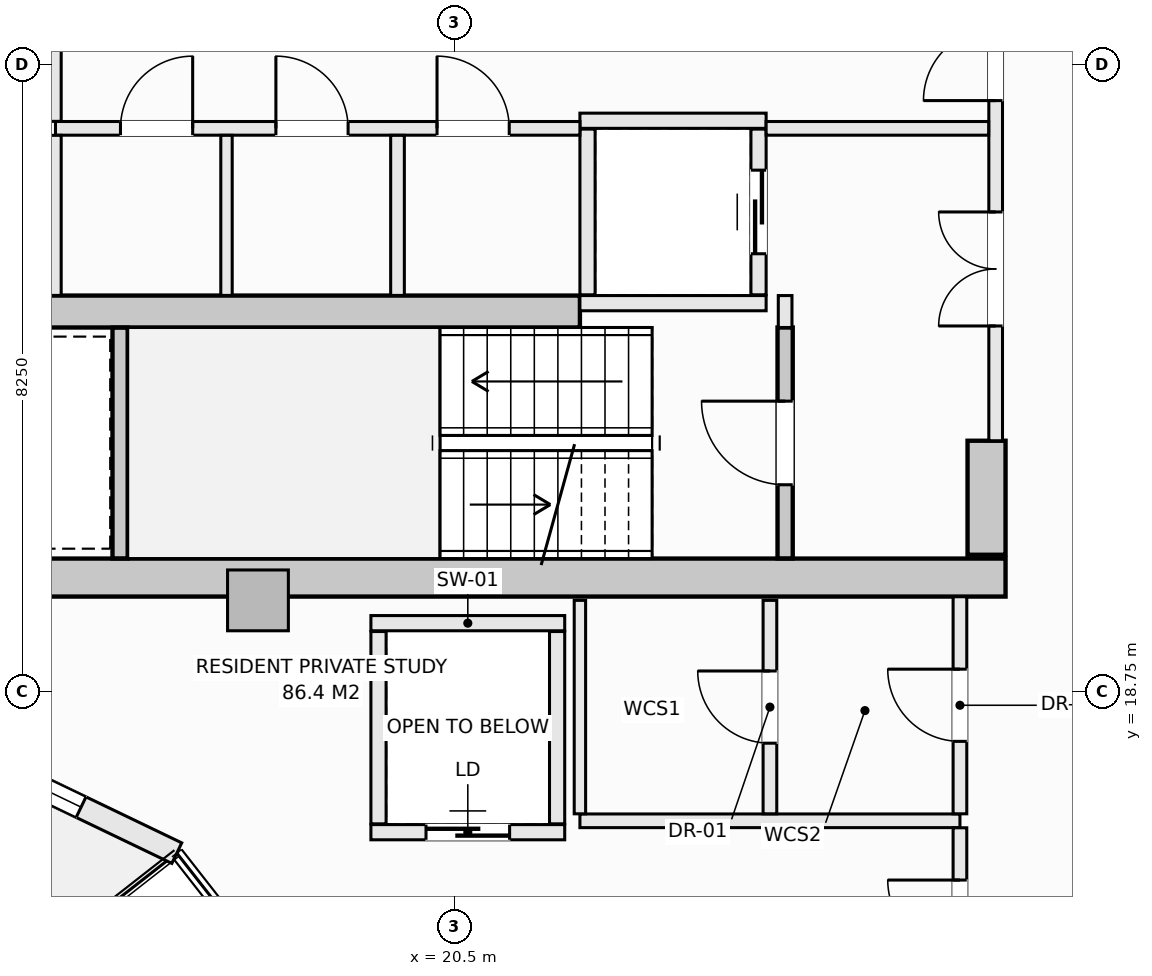
"""IFC4 building model, lengths in metres.
Left out: names, types, materials, properties, quantities, classifications, styles, units other than length and angle.
Written with IfcOpenShell. Run it as: python <this file> out.ifc"""

import sys

from ifc_helpers import new_model, si_unit, direction, frame, frame_2d, origin, origin_2d, place, context, subcontext, project, spatial, rectangle, extrude, element, fill, save


model = new_model("IFC4")
c1 = context("Model", 3, precision=1e-05, world=origin(), true_north=direction((0.0, 1.0)))
c2 = subcontext(c1, "Body", "Model", "MODEL_VIEW")
j1 = project(units=[si_unit("LENGTHUNIT", "METRE"), si_unit("PLANEANGLEUNIT", "RADIAN")], contexts=[c1])
p1 = place(None, origin())
s1 = spatial("IfcSite", under=j1, at=p1, CompositionType="ELEMENT")
p2 = place(p1, origin())
s2 = spatial("IfcBuilding", under=s1, at=p2, CompositionType="ELEMENT")
p3 = place(p2, frame((0.0, 0.0, 272.3)))
s3 = spatial("IfcBuildingStorey", under=s2, at=p3, CompositionType="ELEMENT", Elevation=272.3)
p4 = place(p3, frame((14.25, 20.25, -0.27), z_axis=(0.0, 0.0, 1.0), x_axis=(1.0, 0.0, 0.0)))
e1 = element("IfcWall", 1, at=p4, inside=s3, PredefinedType="SHEAR", context=c2, shape_type="SweptSolid", body=[
    extrude(rectangle(XDim=13.5, YDim=0.5, at=frame_2d((6.75, 0.0))), origin(), (0.0, 0.0, 1.0), 3.25),
])
p5 = place(p3, frame((27.5, 20.55, -0.27), z_axis=(0.0, 0.0, 1.0), x_axis=(0.0, 1.0, 0.0)))
e2 = element("IfcWall", 2, at=p5, inside=s3, PredefinedType="SHEAR", context=c2, shape_type="SweptSolid", body=[
    extrude(rectangle(XDim=1.5, YDim=0.5, at=frame_2d((0.75, 0.0))), origin(), (0.0, 0.0, 1.0), 3.25),
])
p6 = place(p3, frame((14.85, 23.75, -0.27), z_axis=(0.0, 0.0, 1.0), x_axis=(1.0, 0.0, 0.0)))
e3 = element("IfcWall", 3, at=p6, inside=s3, PredefinedType="SHEAR", context=c2, shape_type="SweptSolid", body=[
    extrude(rectangle(XDim=7.3, YDim=0.42, at=frame_2d((3.65, 0.0))), origin(), (0.0, 0.0, 1.0), 3.25),
])
p7 = place(p3, frame((17.914, 19.95, -0.27), z_axis=(0.0, 0.0, 1.0), x_axis=(1.0, 0.0, 0.0)))
e4 = element("IfcColumn", 4, at=p7, inside=s3, PredefinedType="PILASTER", context=c2, shape_type="SweptSolid", body=[
    extrude(rectangle(XDim=0.8, YDim=0.8, at=origin_2d()), origin(), (0.0, 0.0, 1.0), 3.25),
])
p8 = place(p3, frame((12.344, 18.788, 0.0), z_axis=(0.0, 0.0, 1.0), x_axis=(0.901346013132, -0.433099716706, 0.0)))
e5 = element("IfcWall", 5, at=p8, inside=s3, PredefinedType="SOLIDWALL", context=c2, shape_type="SweptSolid", body=[
    extrude(rectangle(XDim=4.994, YDim=0.3, at=frame_2d((2.497, 0.0))), origin(), (0.0, 0.0, 1.0), 2.555),
])
p9 = place(p8, frame((1.397, 0.0, 0.72)))
e6 = element("IfcOpeningElement", 6, at=p9, cuts=e5, PredefinedType="OPENING", context=c2, shape_type="SweptSolid", body=[
    extrude(rectangle(XDim=2.2, YDim=1.65, at=frame_2d((1.1, 0.825))), frame((0.0, 0.16, 0.0), z_axis=(0.0, -1.0, 0.0), x_axis=(1.0, 0.0, 0.0)), (0.0, 0.0, 1.0), 0.32),
])
p10 = place(p3, frame((24.85, 20.502, -0.27), z_axis=(0.0, 0.0, 1.0), x_axis=(0.0, 1.0, 0.0)))
e7 = element("IfcWall", 7, at=p10, inside=s3, PredefinedType="SHEAR", context=c2, shape_type="SweptSolid", body=[
    extrude(rectangle(XDim=3.038, YDim=0.2, at=frame_2d((1.519, 0.0))), origin(), (0.0, 0.0, 1.0), 3.25),
])
p11 = place(p10, frame((0.969, 0.0, 0.27)))
e8 = element("IfcOpeningElement", 8, at=p11, cuts=e7, PredefinedType="OPENING", context=c2, shape_type="SweptSolid", body=[
    extrude(rectangle(XDim=1.1, YDim=2.15, at=frame_2d((0.55, 1.075))), frame((0.0, 0.11, 0.0), z_axis=(0.0, -1.0, 0.0), x_axis=(1.0, 0.0, 0.0)), (0.0, 0.0, 1.0), 0.22),
])
p12 = place(p3, frame((16.1, 20.502, -0.27), z_axis=(0.0, 0.0, 1.0), x_axis=(0.0, 1.0, 0.0)))
e9 = element("IfcWall", 9, at=p12, inside=s3, PredefinedType="SHEAR", context=c2, shape_type="SweptSolid", body=[
    extrude(rectangle(XDim=3.036, YDim=0.2, at=frame_2d((1.518, 0.0))), origin(), (0.0, 0.0, 1.0), 3.25),
])
for number, where, z_axis, x_axis in (
    (10, (22.15, 26.26, 0.0), (0.0, 0.0, 1.0), (1.0, 0.0, 0.0)),
    (11, (22.15, 23.86, 0.0), (0.0, 0.0, 1.0), (1.0, 0.0, 0.0)),
):
    element("IfcWall", number, at=place(p3, frame(where, z_axis=z_axis, x_axis=x_axis)), inside=s3, PredefinedType="SOLIDWALL", context=c2, shape_type="SweptSolid", body=[
        extrude(rectangle(XDim=2.45, YDim=0.2, at=frame_2d((1.225, 0.0))), origin(), (0.0, 0.0, 1.0), 2.98),
    ])
p13 = place(p3, frame((22.25, 23.97, 0.0), z_axis=(0.0, 0.0, 1.0), x_axis=(0.0, 1.0, 0.0)))
e12 = element("IfcWall", 12, at=p13, inside=s3, PredefinedType="SOLIDWALL", context=c2, shape_type="SweptSolid", body=[
    extrude(rectangle(XDim=2.18, YDim=0.2, at=frame_2d((1.09, 0.0))), origin(), (0.0, 0.0, 1.0), 2.98),
])
p14 = place(p3, frame((24.5, 23.97, 0.0), z_axis=(0.0, 0.0, 1.0), x_axis=(0.0, 1.0, 0.0)))
e13 = element("IfcWall", 13, at=p14, inside=s3, PredefinedType="SOLIDWALL", context=c2, shape_type="SweptSolid", body=[
    extrude(rectangle(XDim=2.18, YDim=0.2, at=frame_2d((1.09, 0.0))), origin(), (0.0, 0.0, 1.0), 2.98),
])
p15 = place(p14, frame((0.54, 0.0, 0.0)))
e14 = element("IfcOpeningElement", 14, at=p15, cuts=e13, PredefinedType="OPENING", context=c2, shape_type="SweptSolid", body=[
    extrude(rectangle(XDim=1.1, YDim=2.2, at=frame_2d((0.55, 1.1))), frame((0.0, 0.11, 0.0), z_axis=(0.0, -1.0, 0.0), x_axis=(1.0, 0.0, 0.0)), (0.0, 0.0, 1.0), 0.22),
])
p16 = place(p3, frame((19.4, 19.65, 0.0), z_axis=(0.0, 0.0, 1.0), x_axis=(1.0, 0.0, 0.0)))
e15 = element("IfcWall", 15, at=p16, inside=s3, PredefinedType="SOLIDWALL", context=c2, shape_type="SweptSolid", body=[
    extrude(rectangle(XDim=2.55, YDim=0.2, at=frame_2d((1.275, 0.0))), origin(), (0.0, 0.0, 1.0), 2.98),
])
p17 = place(p3, frame((19.4, 16.9, 0.0), z_axis=(0.0, 0.0, 1.0), x_axis=(1.0, 0.0, 0.0)))
e16 = element("IfcWall", 16, at=p17, inside=s3, PredefinedType="SOLIDWALL", context=c2, shape_type="SweptSolid", body=[
    extrude(rectangle(XDim=2.55, YDim=0.2, at=frame_2d((1.275, 0.0))), origin(), (0.0, 0.0, 1.0), 2.98),
])
p18 = place(p17, frame((0.725, 0.0, 0.0)))
e17 = element("IfcOpeningElement", 17, at=p18, cuts=e16, PredefinedType="OPENING", context=c2, shape_type="SweptSolid", body=[
    extrude(rectangle(XDim=1.1, YDim=2.2, at=frame_2d((0.55, 1.1))), frame((0.0, 0.11, 0.0), z_axis=(0.0, -1.0, 0.0), x_axis=(1.0, 0.0, 0.0)), (0.0, 0.0, 1.0), 0.22),
])
for number, where, z_axis, x_axis in (
    (18, (19.5, 17.01, 0.0), (0.0, 0.0, 1.0), (0.0, 1.0, 0.0)),
    (19, (21.85, 17.01, 0.0), (0.0, 0.0, 1.0), (0.0, 1.0, 0.0)),
):
    element("IfcWall", number, at=place(p3, frame(where, z_axis=z_axis, x_axis=x_axis)), inside=s3, PredefinedType="SOLIDWALL", context=c2, shape_type="SweptSolid", body=[
        extrude(rectangle(XDim=2.53, YDim=0.2, at=frame_2d((1.265, 0.0))), origin(), (0.0, 0.0, 1.0), 2.98),
    ])
p19 = place(p3, frame((24.85, 23.54, 0.0), z_axis=(0.0, 0.0, 1.0), x_axis=(0.0, 1.0, 0.0)))
e20 = element("IfcWall", 20, at=p19, inside=s3, PredefinedType="SOLIDWALL", context=c2, shape_type="SweptSolid", body=[
    extrude(rectangle(XDim=0.42, YDim=0.18, at=frame_2d((0.21, 0.0))), origin(), (0.0, 0.0, 1.0), 2.98),
])
p20 = place(p3, frame((27.62, 22.05, 0.0), z_axis=(0.0, 0.0, 1.0), x_axis=(0.0, 1.0, 0.0)))
e21 = element("IfcWall", 21, at=p20, inside=s3, PredefinedType="SOLIDWALL", context=c2, shape_type="SweptSolid", body=[
    extrude(rectangle(XDim=9.9, YDim=0.18, at=frame_2d((4.95, 0.0))), origin(), (0.0, 0.0, 1.0), 2.98),
])
p21 = place(p20, frame((4.475, 0.0, 0.0)))
e22 = element("IfcOpeningElement", 22, at=p21, cuts=e21, PredefinedType="OPENING", context=c2, shape_type="SweptSolid", body=[
    extrude(rectangle(XDim=0.95, YDim=2.1, at=frame_2d((0.475, 1.05))), frame((0.0, 0.1, 0.0), z_axis=(0.0, -1.0, 0.0), x_axis=(1.0, 0.0, 0.0)), (0.0, 0.0, 1.0), 0.2),
])
p22 = place(p20, frame((6.89, 0.0, 0.0)))
e23 = element("IfcOpeningElement", 23, at=p22, cuts=e21, PredefinedType="OPENING", context=c2, shape_type="SweptSolid", body=[
    extrude(rectangle(XDim=1.5, YDim=2.2, at=frame_2d((0.75, 1.1))), frame((0.0, 0.1, 0.0), z_axis=(0.0, -1.0, 0.0), x_axis=(1.0, 0.0, 0.0)), (0.0, 0.0, 1.0), 0.2),
])
p23 = place(p20, frame((1.51, 0.0, 0.0)))
e24 = element("IfcOpeningElement", 24, at=p23, cuts=e21, PredefinedType="OPENING", context=c2, shape_type="SweptSolid", body=[
    extrude(rectangle(XDim=1.5, YDim=2.2, at=frame_2d((0.75, 1.1))), frame((0.0, 0.1, 0.0), z_axis=(0.0, -1.0, 0.0), x_axis=(1.0, 0.0, 0.0)), (0.0, 0.0, 1.0), 0.2),
])
p24 = place(p3, frame((15.25, 26.16, 0.0), z_axis=(0.0, 0.0, 1.0), x_axis=(1.0, 0.0, 0.0)))
e25 = element("IfcWall", 25, at=p24, inside=s3, PredefinedType="SOLIDWALL", context=c2, shape_type="SweptSolid", body=[
    extrude(rectangle(XDim=6.9, YDim=0.18, at=frame_2d((3.45, 0.0))), origin(), (0.0, 0.0, 1.0), 2.98),
])
p25 = place(p24, frame((5.02, 0.0, 0.0)))
e26 = element("IfcOpeningElement", 26, at=p25, cuts=e25, PredefinedType="OPENING", context=c2, shape_type="SweptSolid", body=[
    extrude(rectangle(XDim=0.95, YDim=2.1, at=frame_2d((0.475, 1.05))), frame((0.0, 0.1, 0.0), z_axis=(0.0, -1.0, 0.0), x_axis=(1.0, 0.0, 0.0)), (0.0, 0.0, 1.0), 0.2),
])
p26 = place(p24, frame((0.855, 0.0, 0.0)))
e27 = element("IfcOpeningElement", 27, at=p26, cuts=e25, PredefinedType="OPENING", context=c2, shape_type="SweptSolid", body=[
    extrude(rectangle(XDim=0.95, YDim=2.1, at=frame_2d((0.475, 1.05))), frame((0.0, 0.1, 0.0), z_axis=(0.0, -1.0, 0.0), x_axis=(1.0, 0.0, 0.0)), (0.0, 0.0, 1.0), 0.2),
])
p27 = place(p24, frame((2.9, 0.0, 0.0)))
e28 = element("IfcOpeningElement", 28, at=p27, cuts=e25, PredefinedType="OPENING", context=c2, shape_type="SweptSolid", body=[
    extrude(rectangle(XDim=0.95, YDim=2.1, at=frame_2d((0.475, 1.05))), frame((0.0, 0.1, 0.0), z_axis=(0.0, -1.0, 0.0), x_axis=(1.0, 0.0, 0.0)), (0.0, 0.0, 1.0), 0.2),
])
p28 = place(p3, frame((24.6, 26.16, 0.0), z_axis=(0.0, 0.0, 1.0), x_axis=(1.0, 0.0, 0.0)))
e29 = element("IfcWall", 29, at=p28, inside=s3, PredefinedType="SOLIDWALL", context=c2, shape_type="SweptSolid", body=[
    extrude(rectangle(XDim=2.928, YDim=0.18, at=frame_2d((1.464, 0.0))), origin(), (0.0, 0.0, 1.0), 2.98),
])
p29 = place(p3, frame((15.25, 23.962, 0.0), z_axis=(0.0, 0.0, 1.0), x_axis=(0.0, 1.0, 0.0)))
e30 = element("IfcWall", 30, at=p29, inside=s3, PredefinedType="PARTITIONING", context=c2, shape_type="SweptSolid", body=[
    extrude(rectangle(XDim=2.106, YDim=0.15, at=frame_2d((1.053, 0.0))), origin(), (0.0, 0.0, 1.0), 2.98),
])
p30 = place(p3, frame((15.25, 26.252, 0.0), z_axis=(0.0, 0.0, 1.0), x_axis=(0.0, 1.0, 0.0)))
e31 = element("IfcWall", 31, at=p30, inside=s3, PredefinedType="PARTITIONING", context=c2, shape_type="SweptSolid", body=[
    extrude(rectangle(XDim=1.496, YDim=0.15, at=frame_2d((0.748, 0.0))), origin(), (0.0, 0.0, 1.0), 2.98),
])
p31 = place(p3, frame((19.75, 23.962, 0.0), z_axis=(0.0, 0.0, 1.0), x_axis=(0.0, 1.0, 0.0)))
e32 = element("IfcWall", 32, at=p31, inside=s3, PredefinedType="SOLIDWALL", context=c2, shape_type="SweptSolid", body=[
    extrude(rectangle(XDim=2.106, YDim=0.18, at=frame_2d((1.053, 0.0))), origin(), (0.0, 0.0, 1.0), 2.98),
])
p32 = place(p3, frame((17.5, 23.962, 0.0), z_axis=(0.0, 0.0, 1.0), x_axis=(0.0, 1.0, 0.0)))
e33 = element("IfcWall", 33, at=p32, inside=s3, PredefinedType="PARTITIONING", context=c2, shape_type="SweptSolid", body=[
    extrude(rectangle(XDim=2.106, YDim=0.15, at=frame_2d((1.053, 0.0))), origin(), (0.0, 0.0, 1.0), 2.98),
])
p33 = place(p3, frame((22.15, 17.05, 0.0), z_axis=(0.0, 0.0, 1.0), x_axis=(1.0, 0.0, 0.0)))
e34 = element("IfcWall", 34, at=p33, inside=s3, PredefinedType="SOLIDWALL", context=c2, shape_type="SweptSolid", body=[
    extrude(rectangle(XDim=5.0, YDim=0.18, at=frame_2d((2.5, 0.0))), origin(), (0.0, 0.0, 1.0), 2.98),
])
p34 = place(p3, frame((22.15, 17.142, 0.0), z_axis=(0.0, 0.0, 1.0), x_axis=(0.0, 1.0, 0.0)))
e35 = element("IfcWall", 35, at=p34, inside=s3, PredefinedType="PARTITIONING", context=c2, shape_type="SweptSolid", body=[
    extrude(rectangle(XDim=2.808, YDim=0.15, at=frame_2d((1.404, 0.0))), origin(), (0.0, 0.0, 1.0), 2.98),
])
p35 = place(p3, frame((24.65, 17.142, 0.0), z_axis=(0.0, 0.0, 1.0), x_axis=(0.0, 1.0, 0.0)))
e36 = element("IfcWall", 36, at=p35, inside=s3, PredefinedType="SOLIDWALL", context=c2, shape_type="SweptSolid", body=[
    extrude(rectangle(XDim=2.808, YDim=0.18, at=frame_2d((1.404, 0.0))), origin(), (0.0, 0.0, 1.0), 2.98),
])
p36 = place(p35, frame((0.929, 0.0, 0.0)))
e37 = element("IfcOpeningElement", 37, at=p36, cuts=e36, PredefinedType="OPENING", context=c2, shape_type="SweptSolid", body=[
    extrude(rectangle(XDim=0.95, YDim=2.1, at=frame_2d((0.475, 1.05))), frame((0.0, 0.1, 0.0), z_axis=(0.0, -1.0, 0.0), x_axis=(1.0, 0.0, 0.0)), (0.0, 0.0, 1.0), 0.2),
])
p37 = place(p3, frame((27.15, 13.181, 0.0), z_axis=(0.0, 0.0, 1.0), x_axis=(0.0, 1.0, 0.0)))
e38 = element("IfcWall", 38, at=p37, inside=s3, PredefinedType="SOLIDWALL", context=c2, shape_type="SweptSolid", body=[
    extrude(rectangle(XDim=3.777, YDim=0.18, at=frame_2d((1.889, 0.0))), origin(), (0.0, 0.0, 1.0), 2.98),
])
p38 = place(p37, frame((2.139, 0.0, 0.0)))
e39 = element("IfcOpeningElement", 39, at=p38, cuts=e38, PredefinedType="OPENING", context=c2, shape_type="SweptSolid", body=[
    extrude(rectangle(XDim=0.95, YDim=2.1, at=frame_2d((0.475, 1.05))), frame((0.0, 0.1, 0.0), z_axis=(0.0, -1.0, 0.0), x_axis=(1.0, 0.0, 0.0)), (0.0, 0.0, 1.0), 0.2),
])
p39 = place(p3, frame((27.15, 17.142, 0.0), z_axis=(0.0, 0.0, 1.0), x_axis=(0.0, 1.0, 0.0)))
e40 = element("IfcWall", 40, at=p39, inside=s3, PredefinedType="SOLIDWALL", context=c2, shape_type="SweptSolid", body=[
    extrude(rectangle(XDim=2.856, YDim=0.18, at=frame_2d((1.428, 0.0))), origin(), (0.0, 0.0, 1.0), 2.98),
])
p40 = place(p39, frame((0.953, 0.0, 0.0)))
e41 = element("IfcOpeningElement", 41, at=p40, cuts=e40, PredefinedType="OPENING", context=c2, shape_type="SweptSolid", body=[
    extrude(rectangle(XDim=0.95, YDim=2.1, at=frame_2d((0.475, 1.05))), frame((0.0, 0.1, 0.0), z_axis=(0.0, -1.0, 0.0), x_axis=(1.0, 0.0, 0.0)), (0.0, 0.0, 1.0), 0.2),
])
p41 = place(p9, origin())
e42 = element("IfcWindow", 42, at=p41, inside=s3, PartitioningType="SINGLE_PANEL", PredefinedType="WINDOW", context=c2, shape_type="SweptSolid", body=[
    extrude(rectangle(XDim=2.2, YDim=1.65, at=frame_2d((1.1, 0.825))), frame((0.0, 0.03, 0.0), z_axis=(0.0, -1.0, 0.0), x_axis=(1.0, 0.0, 0.0)), (0.0, 0.0, 1.0), 0.06),
])
fill(e6, e42)
p42 = place(p11, origin())
e43 = element("IfcDoor", 43, at=p42, inside=s3, OperationType="SINGLE_SWING_RIGHT", PredefinedType="DOOR", context=c2, shape_type="SweptSolid", body=[
    extrude(rectangle(XDim=1.1, YDim=2.15, at=frame_2d((0.55, 1.075))), frame((0.0, 0.025, 0.0), z_axis=(0.0, -1.0, 0.0), x_axis=(1.0, 0.0, 0.0)), (0.0, 0.0, 1.0), 0.05),
])
fill(e8, e43)
p43 = place(p15, origin())
e44 = element("IfcDoor", 44, at=p43, inside=s3, OperationType="SLIDING_TO_LEFT", PredefinedType="DOOR", context=c2, shape_type="SweptSolid", body=[
    extrude(rectangle(XDim=1.1, YDim=2.2, at=frame_2d((0.55, 1.1))), frame((0.0, 0.025, 0.0), z_axis=(0.0, -1.0, 0.0), x_axis=(1.0, 0.0, 0.0)), (0.0, 0.0, 1.0), 0.05),
])
fill(e14, e44)
p44 = place(p18, origin())
e45 = element("IfcDoor", 45, at=p44, inside=s3, OperationType="SLIDING_TO_LEFT", PredefinedType="DOOR", context=c2, shape_type="SweptSolid", body=[
    extrude(rectangle(XDim=1.1, YDim=2.2, at=frame_2d((0.55, 1.1))), frame((0.0, 0.025, 0.0), z_axis=(0.0, -1.0, 0.0), x_axis=(1.0, 0.0, 0.0)), (0.0, 0.0, 1.0), 0.05),
])
fill(e17, e45)
p45 = place(p21, origin())
e46 = element("IfcDoor", 46, at=p45, inside=s3, OperationType="SINGLE_SWING_LEFT", PredefinedType="DOOR", context=c2, shape_type="SweptSolid", body=[
    extrude(rectangle(XDim=0.95, YDim=2.1, at=frame_2d((0.475, 1.05))), frame((0.0, 0.025, 0.0), z_axis=(0.0, -1.0, 0.0), x_axis=(1.0, 0.0, 0.0)), (0.0, 0.0, 1.0), 0.05),
])
fill(e22, e46)
p46 = place(p23, origin())
e47 = element("IfcDoor", 47, at=p46, inside=s3, OperationType="DOUBLE_DOOR_SINGLE_SWING", PredefinedType="DOOR", context=c2, shape_type="SweptSolid", body=[
    extrude(rectangle(XDim=1.5, YDim=2.2, at=frame_2d((0.75, 1.1))), frame((0.0, 0.025, 0.0), z_axis=(0.0, -1.0, 0.0), x_axis=(1.0, 0.0, 0.0)), (0.0, 0.0, 1.0), 0.05),
])
fill(e24, e47)
p47 = place(p25, origin())
e48 = element("IfcDoor", 48, at=p47, inside=s3, OperationType="SINGLE_SWING_LEFT", PredefinedType="DOOR", context=c2, shape_type="SweptSolid", body=[
    extrude(rectangle(XDim=0.95, YDim=2.1, at=frame_2d((0.475, 1.05))), frame((0.0, 0.025, 0.0), z_axis=(0.0, -1.0, 0.0), x_axis=(1.0, 0.0, 0.0)), (0.0, 0.0, 1.0), 0.05),
])
fill(e26, e48)
p48 = place(p26, origin())
e49 = element("IfcDoor", 49, at=p48, inside=s3, OperationType="SINGLE_SWING_RIGHT", PredefinedType="DOOR", context=c2, shape_type="SweptSolid", body=[
    extrude(rectangle(XDim=0.95, YDim=2.1, at=frame_2d((0.475, 1.05))), frame((0.0, 0.025, 0.0), z_axis=(0.0, -1.0, 0.0), x_axis=(1.0, 0.0, 0.0)), (0.0, 0.0, 1.0), 0.05),
])
fill(e27, e49)
p49 = place(p27, origin())
e50 = element("IfcDoor", 50, at=p49, inside=s3, OperationType="SINGLE_SWING_LEFT", PredefinedType="DOOR", context=c2, shape_type="SweptSolid", body=[
    extrude(rectangle(XDim=0.95, YDim=2.1, at=frame_2d((0.475, 1.05))), frame((0.0, 0.025, 0.0), z_axis=(0.0, -1.0, 0.0), x_axis=(1.0, 0.0, 0.0)), (0.0, 0.0, 1.0), 0.05),
])
fill(e28, e50)
p50 = place(p40, origin())
e51 = element("IfcDoor", 51, at=p50, inside=s3, OperationType="SINGLE_SWING_RIGHT", PredefinedType="DOOR", context=c2, shape_type="SweptSolid", body=[
    extrude(rectangle(XDim=0.95, YDim=2.1, at=frame_2d((0.475, 1.05))), frame((0.0, 0.025, 0.0), z_axis=(0.0, -1.0, 0.0), x_axis=(1.0, 0.0, 0.0)), (0.0, 0.0, 1.0), 0.05),
])
fill(e41, e51)
p51 = place(p38, origin())
e52 = element("IfcDoor", 52, at=p51, inside=s3, OperationType="SINGLE_SWING_RIGHT", PredefinedType="DOOR", context=c2, shape_type="SweptSolid", body=[
    extrude(rectangle(XDim=0.95, YDim=2.1, at=frame_2d((0.475, 1.05))), frame((0.0, 0.025, 0.0), z_axis=(0.0, -1.0, 0.0), x_axis=(1.0, 0.0, 0.0)), (0.0, 0.0, 1.0), 0.05),
])
fill(e39, e52)
p52 = place(p36, origin())
e53 = element("IfcDoor", 53, at=p52, inside=s3, OperationType="SINGLE_SWING_RIGHT", PredefinedType="DOOR", context=c2, shape_type="SweptSolid", body=[
    extrude(rectangle(XDim=0.95, YDim=2.1, at=frame_2d((0.475, 1.05))), frame((0.0, 0.025, 0.0), z_axis=(0.0, -1.0, 0.0), x_axis=(1.0, 0.0, 0.0)), (0.0, 0.0, 1.0), 0.05),
])
fill(e37, e53)
save(model, sys.argv[1])
